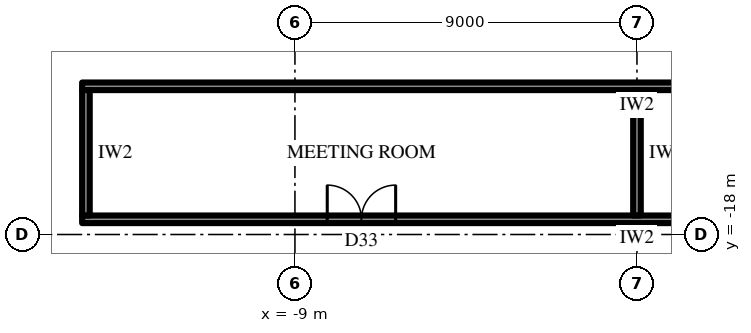
"""IFC4 building model, lengths in metres.
Left out: names, types, materials, properties, quantities, classifications, styles, units other than length and angle.
Written with IfcOpenShell. Run it as: python <this file> out.ifc"""

import sys

from ifc_helpers import new_model, si_unit, direction, frame, frame_2d, origin, place, context, subcontext, project, spatial, rectangle, extrude, element, fill, save


model = new_model("IFC4")
c1 = context("Model", 3, precision=1e-05, world=origin(), true_north=direction((0.0, 1.0)))
c2 = subcontext(c1, "Body", "Model", "MODEL_VIEW")
j1 = project(units=[si_unit("LENGTHUNIT", "METRE"), si_unit("PLANEANGLEUNIT", "RADIAN")], contexts=[c1])
p1 = place(None, origin())
s1 = spatial("IfcSite", under=j1, at=p1, CompositionType="ELEMENT")
p2 = place(p1, origin())
s2 = spatial("IfcBuilding", under=s1, at=p2, CompositionType="ELEMENT")
p3 = place(p2, frame((0.0, 0.0, 286.9)))
s3 = spatial("IfcBuildingStorey", under=s2, at=p3, CompositionType="ELEMENT", Elevation=286.9)
p4 = place(p3, frame((14.6, -14.1, 0.0), z_axis=(0.0, 0.0, 1.0), x_axis=(-1.0, 0.0, 0.0)))
e1 = element("IfcWall", 1, at=p4, inside=s3, PredefinedType="PARTITIONING", context=c2, shape_type="SweptSolid", body=[
    extrude(rectangle(XDim=29.2, YDim=0.2, at=frame_2d((14.6, 0.0))), origin(), (0.0, 0.0, 1.0), 4.0),
])
p5 = place(p3, frame((14.6, -17.6, 0.0), z_axis=(0.0, 0.0, 1.0), x_axis=(-1.0, 0.0, 0.0)))
e2 = element("IfcWall", 2, at=p5, inside=s3, PredefinedType="PARTITIONING", context=c2, shape_type="SweptSolid", body=[
    extrude(rectangle(XDim=29.2, YDim=0.2, at=frame_2d((14.6, 0.0))), origin(), (0.0, 0.0, 1.0), 4.0),
])
p6 = place(p5, frame((6.45, 0.0, 0.0)))
e3 = element("IfcOpeningElement", 3, at=p6, cuts=e2, PredefinedType="OPENING", context=c2, shape_type="SweptSolid", body=[
    extrude(rectangle(XDim=1.8, YDim=2.4, at=frame_2d((0.9, 1.2))), frame((0.0, 0.11, 0.0), z_axis=(0.0, -1.0, 0.0), x_axis=(1.0, 0.0, 0.0)), (0.0, 0.0, 1.0), 0.22),
])
p7 = place(p5, frame((20.95, 0.0, 0.0)))
e4 = element("IfcOpeningElement", 4, at=p7, cuts=e2, PredefinedType="OPENING", context=c2, shape_type="SweptSolid", body=[
    extrude(rectangle(XDim=1.8, YDim=2.4, at=frame_2d((0.9, 1.2))), frame((0.0, 0.11, 0.0), z_axis=(0.0, -1.0, 0.0), x_axis=(1.0, 0.0, 0.0)), (0.0, 0.0, 1.0), 0.22),
])
p8 = place(p3, frame((0.0, -14.2, 0.0), z_axis=(0.0, 0.0, 1.0), x_axis=(0.0, -1.0, 0.0)))
e5 = element("IfcWall", 5, at=p8, inside=s3, PredefinedType="PARTITIONING", context=c2, shape_type="SweptSolid", body=[
    extrude(rectangle(XDim=3.3, YDim=0.2, at=frame_2d((1.65, 0.0))), origin(), (0.0, 0.0, 1.0), 2.992),
])
p9 = place(p3, frame((-14.5, -14.2, 0.0), z_axis=(0.0, 0.0, 1.0), x_axis=(0.0, -1.0, 0.0)))
e6 = element("IfcWall", 6, at=p9, inside=s3, PredefinedType="PARTITIONING", context=c2, shape_type="SweptSolid", body=[
    extrude(rectangle(XDim=3.3, YDim=0.2, at=frame_2d((1.65, 0.0))), origin(), (0.0, 0.0, 1.0), 4.0),
])
p10 = place(p7, frame((1.8, 0.0, 0.0), z_axis=(0.0, 0.0, 1.0), x_axis=(-1.0, 0.0, 0.0)))
e7 = element("IfcDoor", 7, at=p10, inside=s3, OperationType="DOUBLE_DOOR_SINGLE_SWING", PredefinedType="DOOR", context=c2, shape_type="SweptSolid", body=[
    extrude(rectangle(XDim=1.8, YDim=2.4, at=frame_2d((0.9, 1.2))), frame((0.0, 0.025, 0.0), z_axis=(0.0, -1.0, 0.0), x_axis=(1.0, 0.0, 0.0)), (0.0, 0.0, 1.0), 0.05),
])
fill(e4, e7)
save(model, sys.argv[1])
